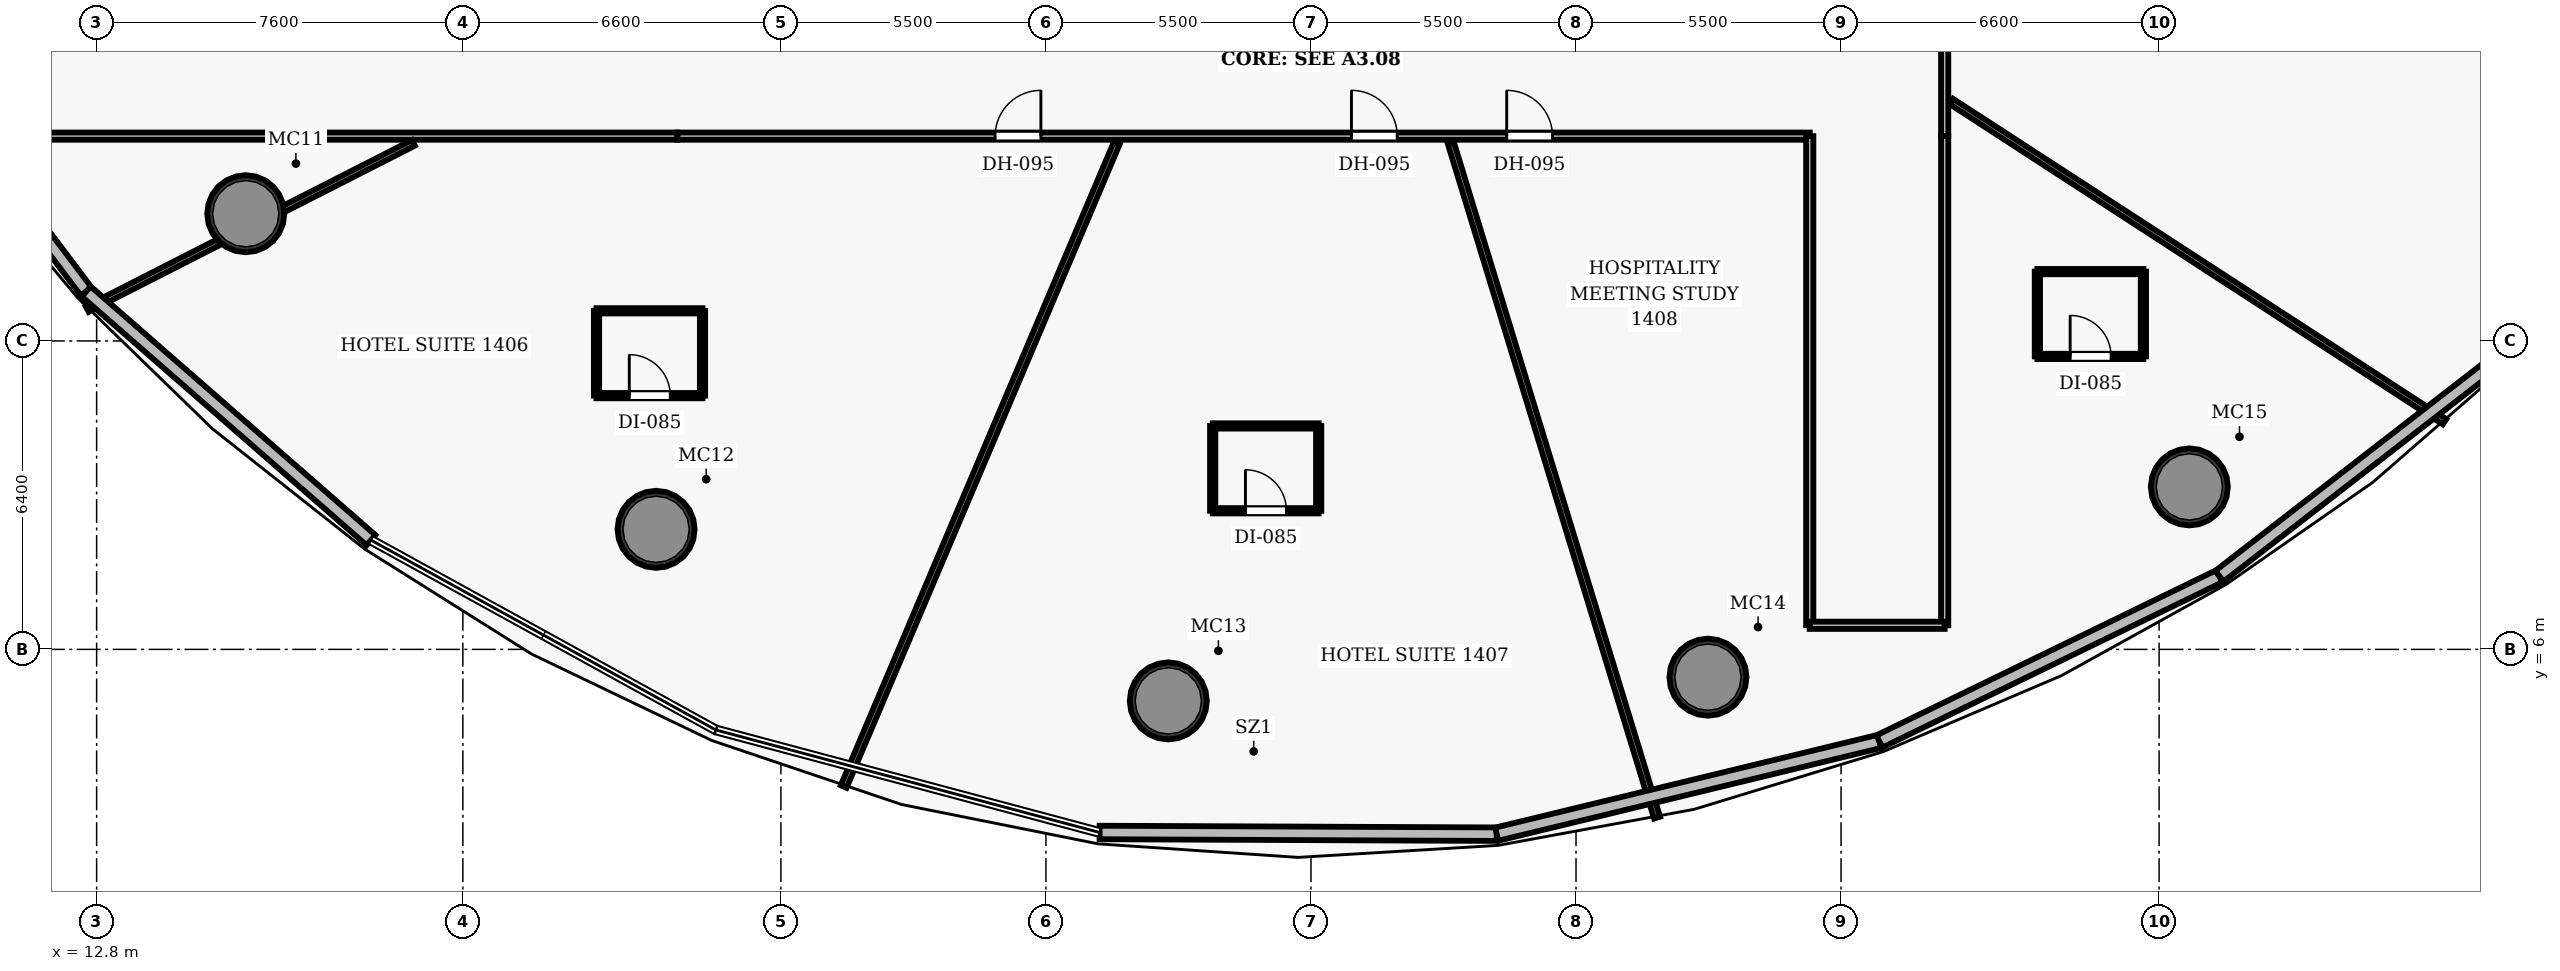
"""IFC4 building model, lengths in metres.
Left out: names, types, materials, properties, quantities, classifications, styles, units other than length and angle.
Written with IfcOpenShell. Run it as: python <this file> out.ifc"""

import sys

from ifc_helpers import new_model, si_unit, direction, frame, frame_2d, origin, origin_2d, place, context, subcontext, project, spatial, rectangle, hollow_circle, extrude, element, fill, save


model = new_model("IFC4")
c1 = context("Model", 3, precision=1e-05, world=origin(), true_north=direction((0.0, 1.0)))
c2 = subcontext(c1, "Body", "Model", "MODEL_VIEW")
j1 = project(units=[si_unit("LENGTHUNIT", "METRE"), si_unit("PLANEANGLEUNIT", "RADIAN")], contexts=[c1])
p1 = place(None, origin())
s1 = spatial("IfcSite", under=j1, at=p1, CompositionType="ELEMENT")
p2 = place(p1, origin())
s2 = spatial("IfcBuilding", under=s1, at=p2, CompositionType="ELEMENT")
p3 = place(p2, frame((0.0, 0.0, 65.9)))
s3 = spatial("IfcBuildingStorey", under=s2, at=p3, CompositionType="ELEMENT", Elevation=65.9)
for number, where, z_axis, x_axis in (
    (1, (15.895, 15.04, 0.0), (0.0, 0.0, 1.0), (1.0, 0.0, 0.0)),
    (2, (24.41, 8.491, 0.0), (0.0, 0.0, 1.0), (1.0, 0.0, 0.0)),
    (3, (35.039, 4.931, 0.0), (0.0, 0.0, 1.0), (1.0, 0.0, 0.0)),
    (4, (46.238, 5.423, 0.0), (0.0, 0.0, 1.0), (1.0, 0.0, 0.0)),
    (5, (56.228, 9.371, 0.0), (0.0, 0.0, 1.0), (1.0, 0.0, 0.0)),
):
    element("IfcColumn", number, at=place(p3, frame(where, z_axis=z_axis, x_axis=x_axis)), inside=s3, PredefinedType="COLUMN", context=c2, shape_type="SweptSolid", body=[
        extrude(hollow_circle(Radius=0.8, WallThickness=0.06, at=origin_2d()), origin(), (0.0, 0.0, 1.0), 3.5),
    ])
p4 = place(p3, frame((24.85, 16.65, 0.0), z_axis=(0.0, 0.0, 1.0), x_axis=(1.0, 0.0, 0.0)))
e6 = element("IfcWall", 6, at=p4, inside=s3, PredefinedType="PARTITIONING", context=c2, shape_type="SweptSolid", body=[
    extrude(rectangle(XDim=23.5, YDim=0.15, at=frame_2d((11.75, 0.0))), origin(), (0.0, 0.0, 1.0), 2.6),
])
p5 = place(p4, frame((6.595, 0.0, 0.0)))
e7 = element("IfcOpeningElement", 7, at=p5, cuts=e6, PredefinedType="OPENING", context=c2, shape_type="SweptSolid", body=[
    extrude(rectangle(XDim=0.95, YDim=2.15, at=frame_2d((0.475, 1.075))), frame((0.0, 0.085, 0.0), z_axis=(0.0, -1.0, 0.0), x_axis=(1.0, 0.0, 0.0)), (0.0, 0.0, 1.0), 0.17),
])
p6 = place(p4, frame((13.99, 0.0, 0.0)))
e8 = element("IfcOpeningElement", 8, at=p6, cuts=e6, PredefinedType="OPENING", context=c2, shape_type="SweptSolid", body=[
    extrude(rectangle(XDim=0.95, YDim=2.15, at=frame_2d((0.475, 1.075))), frame((0.0, 0.085, 0.0), z_axis=(0.0, -1.0, 0.0), x_axis=(1.0, 0.0, 0.0)), (0.0, 0.0, 1.0), 0.17),
])
p7 = place(p4, frame((17.211, 0.0, 0.0)))
e9 = element("IfcOpeningElement", 9, at=p7, cuts=e6, PredefinedType="OPENING", context=c2, shape_type="SweptSolid", body=[
    extrude(rectangle(XDim=0.95, YDim=2.15, at=frame_2d((0.475, 1.075))), frame((0.0, 0.085, 0.0), z_axis=(0.0, -1.0, 0.0), x_axis=(1.0, 0.0, 0.0)), (0.0, 0.0, 1.0), 0.17),
])
p8 = place(p3, frame((51.15, 16.65, 0.0), z_axis=(0.0, 0.0, 1.0), x_axis=(0.0, 1.0, 0.0)))
e10 = element("IfcWall", 10, at=p8, inside=s3, PredefinedType="PARTITIONING", context=c2, shape_type="SweptSolid", body=[
    extrude(rectangle(XDim=15.9, YDim=0.15, at=frame_2d((7.95, 0.0))), origin(), (0.0, 0.0, 1.0), 2.6),
])
p9 = place(p8, frame((11.512, 0.0, 0.0)))
e11 = element("IfcOpeningElement", 11, at=p9, cuts=e10, PredefinedType="OPENING", context=c2, shape_type="SweptSolid", body=[
    extrude(rectangle(XDim=0.95, YDim=2.15, at=frame_2d((0.475, 1.075))), frame((0.0, 0.085, 0.0), z_axis=(0.0, -1.0, 0.0), x_axis=(1.0, 0.0, 0.0)), (0.0, 0.0, 1.0), 0.17),
])
p10 = place(p8, frame((7.004, 0.0, 0.0)))
e12 = element("IfcOpeningElement", 12, at=p10, cuts=e10, PredefinedType="OPENING", context=c2, shape_type="SweptSolid", body=[
    extrude(rectangle(XDim=0.95, YDim=2.15, at=frame_2d((0.475, 1.075))), frame((0.0, 0.085, 0.0), z_axis=(0.0, -1.0, 0.0), x_axis=(1.0, 0.0, 0.0)), (0.0, 0.0, 1.0), 0.17),
])
p11 = place(p3, frame((10.76, 16.65, 0.0), z_axis=(0.0, 0.0, 1.0), x_axis=(1.0, 0.0, 0.0)))
e13 = element("IfcWall", 13, at=p11, inside=s3, PredefinedType="PARTITIONING", context=c2, shape_type="SweptSolid", body=[
    extrude(rectangle(XDim=14.09, YDim=0.15, at=frame_2d((7.045, 0.0))), origin(), (0.0, 0.0, 1.0), 2.6),
])
for number, where, z_axis, x_axis in (
    (14, (48.35, 6.5, 0.0), (0.0, 0.0, 1.0), (0.0, 1.0, 0.0)),
    (15, (51.15, 6.5, 0.0), (0.0, 0.0, 1.0), (0.0, 1.0, 0.0)),
):
    element("IfcWall", number, at=place(p3, frame(where, z_axis=z_axis, x_axis=x_axis)), inside=s3, PredefinedType="PARTITIONING", context=c2, shape_type="SweptSolid", body=[
        extrude(rectangle(XDim=10.15, YDim=0.15, at=frame_2d((5.075, 0.0))), origin(), (0.0, 0.0, 1.0), 2.6),
    ])
p12 = place(p3, frame((48.35, 6.5, 0.0), z_axis=(0.0, 0.0, 1.0), x_axis=(1.0, 0.0, 0.0)))
e16 = element("IfcWall", 16, at=p12, inside=s3, PredefinedType="PARTITIONING", context=c2, shape_type="SweptSolid", body=[
    extrude(rectangle(XDim=2.8, YDim=0.15, at=frame_2d((1.4, 0.0))), origin(), (0.0, 0.0, 1.0), 2.6),
])
p13 = place(p3, frame((19.375, 16.51, 0.0), z_axis=(0.0, 0.0, 1.0), x_axis=(-0.891001978336, -0.453999421366, 0.0)))
e17 = element("IfcWall", 17, at=p13, inside=s3, PredefinedType="PARTITIONING", context=c2, shape_type="SweptSolid", body=[
    extrude(rectangle(XDim=7.598, YDim=0.13, at=frame_2d((3.799, 0.0))), origin(), (0.0, 0.0, 1.0), 2.6),
])
p14 = place(p3, frame((33.972, 16.51, 0.0), z_axis=(0.0, 0.0, 1.0), x_axis=(-0.390730883352, -0.920504957507, 0.0)))
e18 = element("IfcWall", 18, at=p14, inside=s3, PredefinedType="PARTITIONING", context=c2, shape_type="SweptSolid", body=[
    extrude(rectangle(XDim=14.51, YDim=0.13, at=frame_2d((7.255, 0.0))), origin(), (0.0, 0.0, 1.0), 2.6),
])
p15 = place(p3, frame((40.901, 16.51, 0.0), z_axis=(0.0, 0.0, 1.0), x_axis=(0.292367647834, -0.956305996269, 0.0)))
e19 = element("IfcWall", 19, at=p15, inside=s3, PredefinedType="PARTITIONING", context=c2, shape_type="SweptSolid", body=[
    extrude(rectangle(XDim=14.642, YDim=0.13, at=frame_2d((7.321, 0.0))), origin(), (0.0, 0.0, 1.0), 2.6),
])
p16 = place(p3, frame((51.29, 17.369, 0.0), z_axis=(0.0, 0.0, 1.0), x_axis=(0.838666625958, -0.544645105096, 0.0)))
e20 = element("IfcWall", 20, at=p16, inside=s3, PredefinedType="PARTITIONING", context=c2, shape_type="SweptSolid", body=[
    extrude(rectangle(XDim=12.202, YDim=0.13, at=frame_2d((6.101, 0.0))), origin(), (0.0, 0.0, 1.0), 2.6),
])
p17 = place(p3, frame((23.174, 11.265, 0.0), z_axis=(0.0, 0.0, 1.0), x_axis=(1.0, 0.0, 0.0)))
e21 = element("IfcWall", 21, at=p17, inside=s3, PredefinedType="PARTITIONING", context=c2, shape_type="SweptSolid", body=[
    extrude(rectangle(XDim=2.2, YDim=0.11, at=frame_2d((1.1, 0.0))), origin(), (0.0, 0.0, 1.0), 2.6),
])
p18 = place(p17, frame((0.68, 0.0, 0.0)))
e22 = element("IfcOpeningElement", 22, at=p18, cuts=e21, PredefinedType="OPENING", context=c2, shape_type="SweptSolid", body=[
    extrude(rectangle(XDim=0.85, YDim=2.1, at=frame_2d((0.425, 1.05))), frame((0.0, 0.065, 0.0), z_axis=(0.0, -1.0, 0.0), x_axis=(1.0, 0.0, 0.0)), (0.0, 0.0, 1.0), 0.13),
])
p19 = place(p3, frame((23.174, 13.025, 0.0), z_axis=(0.0, 0.0, 1.0), x_axis=(1.0, 0.0, 0.0)))
e23 = element("IfcWall", 23, at=p19, inside=s3, PredefinedType="PARTITIONING", context=c2, shape_type="SweptSolid", body=[
    extrude(rectangle(XDim=2.2, YDim=0.11, at=frame_2d((1.1, 0.0))), origin(), (0.0, 0.0, 1.0), 2.6),
])
for number, where, z_axis, x_axis in (
    (24, (23.174, 11.265, 0.0), (0.0, 0.0, 1.0), (0.0, 1.0, 0.0)),
    (25, (25.374, 11.265, 0.0), (0.0, 0.0, 1.0), (0.0, 1.0, 0.0)),
):
    element("IfcWall", number, at=place(p3, frame(where, z_axis=z_axis, x_axis=x_axis)), inside=s3, PredefinedType="PARTITIONING", context=c2, shape_type="SweptSolid", body=[
        extrude(rectangle(XDim=1.76, YDim=0.11, at=frame_2d((0.88, 0.0))), origin(), (0.0, 0.0, 1.0), 2.6),
    ])
p20 = place(p3, frame((35.96, 8.876, 0.0), z_axis=(0.0, 0.0, 1.0), x_axis=(1.0, 0.0, 0.0)))
e26 = element("IfcWall", 26, at=p20, inside=s3, PredefinedType="PARTITIONING", context=c2, shape_type="SweptSolid", body=[
    extrude(rectangle(XDim=2.2, YDim=0.11, at=frame_2d((1.1, 0.0))), origin(), (0.0, 0.0, 1.0), 2.6),
])
p21 = place(p20, frame((0.68, 0.0, 0.0)))
e27 = element("IfcOpeningElement", 27, at=p21, cuts=e26, PredefinedType="OPENING", context=c2, shape_type="SweptSolid", body=[
    extrude(rectangle(XDim=0.85, YDim=2.1, at=frame_2d((0.425, 1.05))), frame((0.0, 0.065, 0.0), z_axis=(0.0, -1.0, 0.0), x_axis=(1.0, 0.0, 0.0)), (0.0, 0.0, 1.0), 0.13),
])
p22 = place(p3, frame((35.96, 10.636, 0.0), z_axis=(0.0, 0.0, 1.0), x_axis=(1.0, 0.0, 0.0)))
e28 = element("IfcWall", 28, at=p22, inside=s3, PredefinedType="PARTITIONING", context=c2, shape_type="SweptSolid", body=[
    extrude(rectangle(XDim=2.2, YDim=0.11, at=frame_2d((1.1, 0.0))), origin(), (0.0, 0.0, 1.0), 2.6),
])
for number, where, z_axis, x_axis in (
    (29, (35.96, 8.876, 0.0), (0.0, 0.0, 1.0), (0.0, 1.0, 0.0)),
    (30, (38.16, 8.876, 0.0), (0.0, 0.0, 1.0), (0.0, 1.0, 0.0)),
):
    element("IfcWall", number, at=place(p3, frame(where, z_axis=z_axis, x_axis=x_axis)), inside=s3, PredefinedType="PARTITIONING", context=c2, shape_type="SweptSolid", body=[
        extrude(rectangle(XDim=1.76, YDim=0.11, at=frame_2d((0.88, 0.0))), origin(), (0.0, 0.0, 1.0), 2.6),
    ])
p23 = place(p3, frame((53.074, 12.079, 0.0), z_axis=(0.0, 0.0, 1.0), x_axis=(1.0, 0.0, 0.0)))
e31 = element("IfcWall", 31, at=p23, inside=s3, PredefinedType="PARTITIONING", context=c2, shape_type="SweptSolid", body=[
    extrude(rectangle(XDim=2.2, YDim=0.11, at=frame_2d((1.1, 0.0))), origin(), (0.0, 0.0, 1.0), 2.6),
])
p24 = place(p23, frame((0.68, 0.0, 0.0)))
e32 = element("IfcOpeningElement", 32, at=p24, cuts=e31, PredefinedType="OPENING", context=c2, shape_type="SweptSolid", body=[
    extrude(rectangle(XDim=0.85, YDim=2.1, at=frame_2d((0.425, 1.05))), frame((0.0, 0.065, 0.0), z_axis=(0.0, -1.0, 0.0), x_axis=(1.0, 0.0, 0.0)), (0.0, 0.0, 1.0), 0.13),
])
p25 = place(p3, frame((53.074, 13.839, 0.0), z_axis=(0.0, 0.0, 1.0), x_axis=(1.0, 0.0, 0.0)))
e33 = element("IfcWall", 33, at=p25, inside=s3, PredefinedType="PARTITIONING", context=c2, shape_type="SweptSolid", body=[
    extrude(rectangle(XDim=2.2, YDim=0.11, at=frame_2d((1.1, 0.0))), origin(), (0.0, 0.0, 1.0), 2.6),
])
for number, where, z_axis, x_axis in (
    (34, (53.074, 12.079, 0.0), (0.0, 0.0, 1.0), (0.0, 1.0, 0.0)),
    (35, (55.274, 12.079, 0.0), (0.0, 0.0, 1.0), (0.0, 1.0, 0.0)),
):
    element("IfcWall", number, at=place(p3, frame(where, z_axis=z_axis, x_axis=x_axis)), inside=s3, PredefinedType="PARTITIONING", context=c2, shape_type="SweptSolid", body=[
        extrude(rectangle(XDim=1.76, YDim=0.11, at=frame_2d((0.88, 0.0))), origin(), (0.0, 0.0, 1.0), 2.6),
    ])
p26 = place(p3, frame((12.583, 13.426, 0.0), z_axis=(0.0, 0.0, 1.0), x_axis=(-0.602327192547, 0.798249305116, 0.0)))
e36 = element("IfcWall", 36, at=p26, inside=s3, PredefinedType="SOLIDWALL", context=c2, shape_type="SweptSolid", body=[
    extrude(rectangle(XDim=7.143, YDim=0.28, at=frame_2d((3.571, 0.0))), origin(), (0.0, 0.0, 1.0), 3.25),
])
p27 = place(p3, frame((18.493, 8.267, 0.0), z_axis=(0.0, 0.0, 1.0), x_axis=(-0.753362705376, 0.657605226673, 0.0)))
e37 = element("IfcWall", 37, at=p27, inside=s3, PredefinedType="SOLIDWALL", context=c2, shape_type="SweptSolid", body=[
    extrude(rectangle(XDim=7.845, YDim=0.28, at=frame_2d((3.922, 0.0))), origin(), (0.0, 0.0, 1.0), 3.25),
])
p28 = place(p3, frame((41.855, 2.166, 0.0), z_axis=(0.0, 0.0, 1.0), x_axis=(-0.999990900598, 0.004265995843, 0.0)))
e38 = element("IfcWall", 38, at=p28, inside=s3, PredefinedType="SOLIDWALL", context=c2, shape_type="SweptSolid", body=[
    extrude(rectangle(XDim=8.241, YDim=0.28, at=frame_2d((4.121, 0.0))), origin(), (0.0, 0.0, 1.0), 3.25),
])
p29 = place(p3, frame((49.796, 4.091, 0.0), z_axis=(0.0, 0.0, 1.0), x_axis=(-0.971850727629, -0.235597460104, 0.0)))
e39 = element("IfcWall", 39, at=p29, inside=s3, PredefinedType="SOLIDWALL", context=c2, shape_type="SweptSolid", body=[
    extrude(rectangle(XDim=8.171, YDim=0.28, at=frame_2d((4.085, 0.0))), origin(), (0.0, 0.0, 1.0), 3.25),
])
p30 = place(p3, frame((56.852, 7.519, 0.0), z_axis=(0.0, 0.0, 1.0), x_axis=(-0.899430218245, -0.437064391718, 0.0)))
e40 = element("IfcWall", 40, at=p30, inside=s3, PredefinedType="SOLIDWALL", context=c2, shape_type="SweptSolid", body=[
    extrude(rectangle(XDim=7.845, YDim=0.28, at=frame_2d((3.922, 0.0))), origin(), (0.0, 0.0, 1.0), 3.25),
])
p31 = place(p3, frame((62.499, 11.894, 0.0), z_axis=(0.0, 0.0, 1.0), x_axis=(-0.790547015507, -0.612401352278, 0.0)))
e41 = element("IfcWall", 41, at=p31, inside=s3, PredefinedType="SOLIDWALL", context=c2, shape_type="SweptSolid", body=[
    extrude(rectangle(XDim=7.143, YDim=0.28, at=frame_2d((3.571, 0.0))), origin(), (0.0, 0.0, 1.0), 3.25),
])
p32 = place(p5, origin())
e42 = element("IfcDoor", 42, at=p32, inside=s3, OperationType="SINGLE_SWING_RIGHT", PredefinedType="DOOR", context=c2, shape_type="SweptSolid", body=[
    extrude(rectangle(XDim=0.95, YDim=2.15, at=frame_2d((0.475, 1.075))), frame((0.0, 0.025, 0.0), z_axis=(0.0, -1.0, 0.0), x_axis=(1.0, 0.0, 0.0)), (0.0, 0.0, 1.0), 0.05),
])
fill(e7, e42)
p33 = place(p18, origin())
e43 = element("IfcDoor", 43, at=p33, inside=s3, OperationType="SINGLE_SWING_LEFT", PredefinedType="DOOR", context=c2, shape_type="SweptSolid", body=[
    extrude(rectangle(XDim=0.85, YDim=2.1, at=frame_2d((0.425, 1.05))), frame((0.0, 0.025, 0.0), z_axis=(0.0, -1.0, 0.0), x_axis=(1.0, 0.0, 0.0)), (0.0, 0.0, 1.0), 0.05),
])
fill(e22, e43)
p34 = place(p6, origin())
e44 = element("IfcDoor", 44, at=p34, inside=s3, OperationType="SINGLE_SWING_LEFT", PredefinedType="DOOR", context=c2, shape_type="SweptSolid", body=[
    extrude(rectangle(XDim=0.95, YDim=2.15, at=frame_2d((0.475, 1.075))), frame((0.0, 0.025, 0.0), z_axis=(0.0, -1.0, 0.0), x_axis=(1.0, 0.0, 0.0)), (0.0, 0.0, 1.0), 0.05),
])
fill(e8, e44)
p35 = place(p21, origin())
e45 = element("IfcDoor", 45, at=p35, inside=s3, OperationType="SINGLE_SWING_LEFT", PredefinedType="DOOR", context=c2, shape_type="SweptSolid", body=[
    extrude(rectangle(XDim=0.85, YDim=2.1, at=frame_2d((0.425, 1.05))), frame((0.0, 0.025, 0.0), z_axis=(0.0, -1.0, 0.0), x_axis=(1.0, 0.0, 0.0)), (0.0, 0.0, 1.0), 0.05),
])
fill(e27, e45)
p36 = place(p7, origin())
e46 = element("IfcDoor", 46, at=p36, inside=s3, OperationType="SINGLE_SWING_LEFT", PredefinedType="DOOR", context=c2, shape_type="SweptSolid", body=[
    extrude(rectangle(XDim=0.95, YDim=2.15, at=frame_2d((0.475, 1.075))), frame((0.0, 0.025, 0.0), z_axis=(0.0, -1.0, 0.0), x_axis=(1.0, 0.0, 0.0)), (0.0, 0.0, 1.0), 0.05),
])
fill(e9, e46)
p37 = place(p24, origin())
e47 = element("IfcDoor", 47, at=p37, inside=s3, OperationType="SINGLE_SWING_LEFT", PredefinedType="DOOR", context=c2, shape_type="SweptSolid", body=[
    extrude(rectangle(XDim=0.85, YDim=2.1, at=frame_2d((0.425, 1.05))), frame((0.0, 0.025, 0.0), z_axis=(0.0, -1.0, 0.0), x_axis=(1.0, 0.0, 0.0)), (0.0, 0.0, 1.0), 0.05),
])
fill(e32, e47)
save(model, sys.argv[1])
